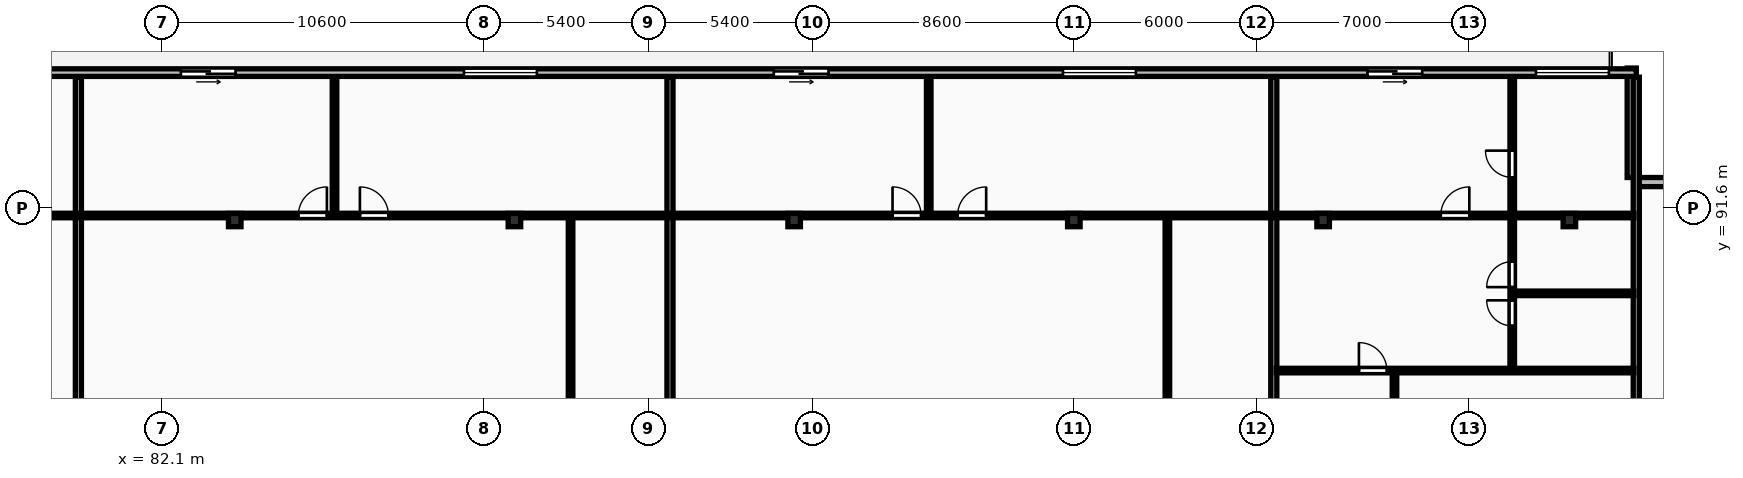
"""IFC4 building model, lengths in metres.
Left out: names, types, materials, properties, quantities, classifications, styles, units other than length and angle.
Written with IfcOpenShell. Run it as: python <this file> out.ifc"""

import sys

from ifc_helpers import new_model, si_unit, direction, frame, frame_2d, origin, origin_2d, place, context, subcontext, project, spatial, rectangle, i_section, extrude, element, fill, save


model = new_model("IFC4")
c1 = context("Model", 3, precision=1e-05, world=origin(), true_north=direction((0.0, 1.0)))
c2 = subcontext(c1, "Body", "Model", "MODEL_VIEW")
j1 = project(units=[si_unit("LENGTHUNIT", "METRE"), si_unit("PLANEANGLEUNIT", "RADIAN")], contexts=[c1])
p1 = place(None, origin())
s1 = spatial("IfcSite", under=j1, at=p1, CompositionType="ELEMENT")
p2 = place(p1, origin())
s2 = spatial("IfcBuilding", under=s1, at=p2, CompositionType="ELEMENT")
p3 = place(p2, frame((0.0, 0.0, 150.1)))
s3 = spatial("IfcBuildingStorey", under=s2, at=p3, CompositionType="ELEMENT", Elevation=150.1)
for number, where, z_axis, x_axis in (
    (1, (84.5, 91.2, 0.0), (0.0, 0.0, 1.0), (1.0, 0.0, 0.0)),
    (2, (93.7, 91.2, 0.0), (0.0, 0.0, 1.0), (1.0, 0.0, 0.0)),
    (3, (102.9, 91.2, 0.0), (0.0, 0.0, 1.0), (1.0, 0.0, 0.0)),
    (4, (112.1, 91.2, 0.0), (0.0, 0.0, 1.0), (1.0, 0.0, 0.0)),
    (5, (120.3, 91.2, 0.0), (0.0, 0.0, 1.0), (1.0, 0.0, 0.0)),
    (6, (128.4, 91.2, 0.0), (0.0, 0.0, 1.0), (1.0, 0.0, 0.0)),
):
    element("IfcColumn", number, at=place(p3, frame(where, z_axis=z_axis, x_axis=x_axis)), inside=s3, PredefinedType="COLUMN", context=c2, shape_type="SweptSolid", body=[
        extrude(i_section(OverallWidth=0.412, OverallDepth=0.437, WebThickness=0.036, FlangeThickness=0.052, FilletRadius=0.015, at=origin_2d()), origin(), (0.0, 0.0, 1.0), 3.6),
    ])
for number, where, z_axis, x_axis in (
    (7, (134.2, 92.45, 0.0), (0.0, 0.0, 1.0), (-1.0, 0.0, 0.0)),
    (8, (130.45, 92.6, 0.0), (0.0, 0.0, 1.0), (0.0, 1.0, 0.0)),
):
    element("IfcWall", number, at=place(p3, frame(where, z_axis=z_axis, x_axis=x_axis)), inside=s3, PredefinedType="STANDARD", context=c2, shape_type="SweptSolid", body=[
        extrude(rectangle(XDim=3.6, YDim=0.3, at=frame_2d((1.8, 0.0))), origin(), (0.0, 0.0, 1.0), 3.31),
    ])
p4 = place(p3, frame((130.6, 96.05, 0.0), z_axis=(0.0, 0.0, 1.0), x_axis=(-1.0, 0.0, 0.0)))
e9 = element("IfcWall", 9, at=p4, inside=s3, PredefinedType="STANDARD", context=c2, shape_type="SweptSolid", body=[
    extrude(rectangle(XDim=73.0, YDim=0.25, at=frame_2d((36.5, 0.0))), origin(), (0.0, 0.0, 1.0), 3.31),
])
p5 = place(p4, frame((67.311, 0.0, 0.0)))
e10 = element("IfcOpeningElement", 10, at=p5, cuts=e9, PredefinedType="OPENING", context=c2, shape_type="SweptSolid", body=[
    extrude(rectangle(XDim=1.8, YDim=2.2, at=frame_2d((0.9, 1.1))), frame((0.0, 0.135, 0.0), z_axis=(0.0, -1.0, 0.0), x_axis=(1.0, 0.0, 0.0)), (0.0, 0.0, 1.0), 0.27),
])
p6 = place(p4, frame((56.252, 0.0, 0.85)))
e11 = element("IfcOpeningElement", 11, at=p6, cuts=e9, PredefinedType="OPENING", context=c2, shape_type="SweptSolid", body=[
    extrude(rectangle(XDim=2.4, YDim=1.9, at=frame_2d((1.2, 0.95))), frame((0.0, 0.135, 0.0), z_axis=(0.0, -1.0, 0.0), x_axis=(1.0, 0.0, 0.0)), (0.0, 0.0, 1.0), 0.27),
])
p7 = place(p4, frame((46.071, 0.0, 0.0)))
e12 = element("IfcOpeningElement", 12, at=p7, cuts=e9, PredefinedType="OPENING", context=c2, shape_type="SweptSolid", body=[
    extrude(rectangle(XDim=1.8, YDim=2.2, at=frame_2d((0.9, 1.1))), frame((0.0, 0.135, 0.0), z_axis=(0.0, -1.0, 0.0), x_axis=(1.0, 0.0, 0.0)), (0.0, 0.0, 1.0), 0.27),
])
p8 = place(p4, frame((36.161, 0.0, 0.85)))
e13 = element("IfcOpeningElement", 13, at=p8, cuts=e9, PredefinedType="OPENING", context=c2, shape_type="SweptSolid", body=[
    extrude(rectangle(XDim=2.4, YDim=1.9, at=frame_2d((1.2, 0.95))), frame((0.0, 0.135, 0.0), z_axis=(0.0, -1.0, 0.0), x_axis=(1.0, 0.0, 0.0)), (0.0, 0.0, 1.0), 0.27),
])
p9 = place(p4, frame((26.569, 0.0, 0.0)))
e14 = element("IfcOpeningElement", 14, at=p9, cuts=e9, PredefinedType="OPENING", context=c2, shape_type="SweptSolid", body=[
    extrude(rectangle(XDim=1.8, YDim=2.2, at=frame_2d((0.9, 1.1))), frame((0.0, 0.135, 0.0), z_axis=(0.0, -1.0, 0.0), x_axis=(1.0, 0.0, 0.0)), (0.0, 0.0, 1.0), 0.27),
])
p10 = place(p4, frame((16.458, 0.0, 0.85)))
e15 = element("IfcOpeningElement", 15, at=p10, cuts=e9, PredefinedType="OPENING", context=c2, shape_type="SweptSolid", body=[
    extrude(rectangle(XDim=2.4, YDim=1.9, at=frame_2d((1.2, 0.95))), frame((0.0, 0.135, 0.0), z_axis=(0.0, -1.0, 0.0), x_axis=(1.0, 0.0, 0.0)), (0.0, 0.0, 1.0), 0.27),
])
p11 = place(p4, frame((7.042, 0.0, 0.0)))
e16 = element("IfcOpeningElement", 16, at=p11, cuts=e9, PredefinedType="OPENING", context=c2, shape_type="SweptSolid", body=[
    extrude(rectangle(XDim=1.8, YDim=2.2, at=frame_2d((0.9, 1.1))), frame((0.0, 0.135, 0.0), z_axis=(0.0, -1.0, 0.0), x_axis=(1.0, 0.0, 0.0)), (0.0, 0.0, 1.0), 0.27),
])
p12 = place(p4, frame((0.9, 0.0, 0.85)))
e17 = element("IfcOpeningElement", 17, at=p12, cuts=e9, PredefinedType="OPENING", context=c2, shape_type="SweptSolid", body=[
    extrude(rectangle(XDim=2.4, YDim=1.9, at=frame_2d((1.2, 0.95))), frame((0.0, 0.135, 0.0), z_axis=(0.0, -1.0, 0.0), x_axis=(1.0, 0.0, 0.0)), (0.0, 0.0, 1.0), 0.27),
])
for number, where, z_axis, x_axis in (
    (18, (130.6, 69.83, 0.0), (0.0, 0.0, 1.0), (0.0, 1.0, 0.0)),
    (19, (79.357, 69.83, 0.0), (0.0, 0.0, 1.0), (0.0, 1.0, 0.0)),
):
    element("IfcWall", number, at=place(p3, frame(where, z_axis=z_axis, x_axis=x_axis)), inside=s3, PredefinedType="PARTITIONING", context=c2, shape_type="SweptSolid", body=[
        extrude(rectangle(XDim=26.07, YDim=0.2, at=frame_2d((13.035, 0.0))), origin(), (0.0, 0.0, 1.0), 3.31),
    ])
p13 = place(p3, frame((57.68, 91.35, 0.0), z_axis=(0.0, 0.0, 1.0), x_axis=(1.0, 0.0, 0.0)))
e20 = element("IfcWall", 20, at=p13, inside=s3, PredefinedType="PARTITIONING", context=c2, shape_type="SweptSolid", body=[
    extrude(rectangle(XDim=21.597, YDim=0.15, at=frame_2d((10.799, 0.0))), origin(), (0.0, 0.0, 1.0), 3.003),
])
p14 = place(p13, frame((7.89, 0.0, 0.0)))
e21 = element("IfcOpeningElement", 21, at=p14, cuts=e20, PredefinedType="OPENING", context=c2, shape_type="SweptSolid", body=[
    extrude(rectangle(XDim=0.92, YDim=2.08, at=frame_2d((0.46, 1.04))), frame((0.0, 0.085, 0.0), z_axis=(0.0, -1.0, 0.0), x_axis=(1.0, 0.0, 0.0)), (0.0, 0.0, 1.0), 0.17),
])
p15 = place(p13, frame((11.842, 0.0, 0.0)))
e22 = element("IfcOpeningElement", 22, at=p15, cuts=e20, PredefinedType="OPENING", context=c2, shape_type="SweptSolid", body=[
    extrude(rectangle(XDim=0.92, YDim=2.08, at=frame_2d((0.46, 1.04))), frame((0.0, 0.085, 0.0), z_axis=(0.0, -1.0, 0.0), x_axis=(1.0, 0.0, 0.0)), (0.0, 0.0, 1.0), 0.17),
])
p16 = place(p3, frame((98.816, 69.83, 0.0), z_axis=(0.0, 0.0, 1.0), x_axis=(0.0, 1.0, 0.0)))
e23 = element("IfcWall", 23, at=p16, inside=s3, PredefinedType="PARTITIONING", context=c2, shape_type="SweptSolid", body=[
    extrude(rectangle(XDim=26.07, YDim=0.2, at=frame_2d((13.035, 0.0))), origin(), (0.0, 0.0, 1.0), 3.31),
])
p17 = place(p3, frame((95.546, 69.81, 0.0), z_axis=(0.0, 0.0, 1.0), x_axis=(0.0, 1.0, 0.0)))
e24 = element("IfcWall", 24, at=p17, inside=s3, PredefinedType="PARTITIONING", context=c2, shape_type="SweptSolid", body=[
    extrude(rectangle(XDim=21.48, YDim=0.15, at=frame_2d((10.74, 0.0))), origin(), (0.0, 0.0, 1.0), 3.31),
])
p18 = place(p17, frame((2.406, 0.0, 0.0)))
e25 = element("IfcOpeningElement", 25, at=p18, cuts=e24, PredefinedType="OPENING", context=c2, shape_type="SweptSolid", body=[
    extrude(rectangle(XDim=0.96, YDim=2.1, at=frame_2d((0.48, 1.05))), frame((0.0, 0.085, 0.0), z_axis=(0.0, -1.0, 0.0), x_axis=(1.0, 0.0, 0.0)), (0.0, 0.0, 1.0), 0.17),
])
p19 = place(p17, frame((6.133, 0.0, 0.0)))
e26 = element("IfcOpeningElement", 26, at=p19, cuts=e24, PredefinedType="OPENING", context=c2, shape_type="SweptSolid", body=[
    extrude(rectangle(XDim=0.88, YDim=2.06, at=frame_2d((0.44, 1.03))), frame((0.0, 0.085, 0.0), z_axis=(0.0, -1.0, 0.0), x_axis=(1.0, 0.0, 0.0)), (0.0, 0.0, 1.0), 0.17),
])
p20 = place(p17, frame((11.336, 0.0, 0.0)))
e27 = element("IfcOpeningElement", 27, at=p20, cuts=e24, PredefinedType="OPENING", context=c2, shape_type="SweptSolid", body=[
    extrude(rectangle(XDim=0.84, YDim=2.04, at=frame_2d((0.42, 1.02))), frame((0.0, 0.085, 0.0), z_axis=(0.0, -1.0, 0.0), x_axis=(1.0, 0.0, 0.0)), (0.0, 0.0, 1.0), 0.17),
])
p21 = place(p3, frame((87.781, 91.43, 0.0), z_axis=(0.0, 0.0, 1.0), x_axis=(0.0, 1.0, 0.0)))
e28 = element("IfcWall", 28, at=p21, inside=s3, PredefinedType="PARTITIONING", context=c2, shape_type="SweptSolid", body=[
    extrude(rectangle(XDim=4.47, YDim=0.15, at=frame_2d((2.235, 0.0))), origin(), (0.0, 0.0, 1.0), 3.31),
])
p22 = place(p3, frame((79.437, 91.35, 0.0), z_axis=(0.0, 0.0, 1.0), x_axis=(1.0, 0.0, 0.0)))
e29 = element("IfcWall", 29, at=p22, inside=s3, PredefinedType="PARTITIONING", context=c2, shape_type="SweptSolid", body=[
    extrude(rectangle(XDim=19.299, YDim=0.15, at=frame_2d((9.649, 0.0))), origin(), (0.0, 0.0, 1.0), 3.003),
])
p23 = place(p22, frame((7.155, 0.0, 0.0)))
e30 = element("IfcOpeningElement", 30, at=p23, cuts=e29, PredefinedType="OPENING", context=c2, shape_type="SweptSolid", body=[
    extrude(rectangle(XDim=0.94, YDim=2.1, at=frame_2d((0.47, 1.05))), frame((0.0, 0.085, 0.0), z_axis=(0.0, -1.0, 0.0), x_axis=(1.0, 0.0, 0.0)), (0.0, 0.0, 1.0), 0.17),
])
p24 = place(p22, frame((9.179, 0.0, 0.0)))
e31 = element("IfcOpeningElement", 31, at=p24, cuts=e29, PredefinedType="OPENING", context=c2, shape_type="SweptSolid", body=[
    extrude(rectangle(XDim=0.94, YDim=2.1, at=frame_2d((0.47, 1.05))), frame((0.0, 0.085, 0.0), z_axis=(0.0, -1.0, 0.0), x_axis=(1.0, 0.0, 0.0)), (0.0, 0.0, 1.0), 0.17),
])
p25 = place(p3, frame((118.677, 69.83, 0.0), z_axis=(0.0, 0.0, 1.0), x_axis=(0.0, 1.0, 0.0)))
e32 = element("IfcWall", 32, at=p25, inside=s3, PredefinedType="PARTITIONING", context=c2, shape_type="SweptSolid", body=[
    extrude(rectangle(XDim=26.07, YDim=0.2, at=frame_2d((13.035, 0.0))), origin(), (0.0, 0.0, 1.0), 3.31),
])
p26 = place(p3, frame((115.177, 69.81, 0.0), z_axis=(0.0, 0.0, 1.0), x_axis=(0.0, 1.0, 0.0)))
e33 = element("IfcWall", 33, at=p26, inside=s3, PredefinedType="PARTITIONING", context=c2, shape_type="SweptSolid", body=[
    extrude(rectangle(XDim=21.48, YDim=0.15, at=frame_2d((10.74, 0.0))), origin(), (0.0, 0.0, 1.0), 3.31),
])
p27 = place(p26, frame((2.406, 0.0, 0.0)))
e34 = element("IfcOpeningElement", 34, at=p27, cuts=e33, PredefinedType="OPENING", context=c2, shape_type="SweptSolid", body=[
    extrude(rectangle(XDim=0.96, YDim=2.1, at=frame_2d((0.48, 1.05))), frame((0.0, 0.085, 0.0), z_axis=(0.0, -1.0, 0.0), x_axis=(1.0, 0.0, 0.0)), (0.0, 0.0, 1.0), 0.17),
])
p28 = place(p26, frame((6.133, 0.0, 0.0)))
e35 = element("IfcOpeningElement", 35, at=p28, cuts=e33, PredefinedType="OPENING", context=c2, shape_type="SweptSolid", body=[
    extrude(rectangle(XDim=0.88, YDim=2.06, at=frame_2d((0.44, 1.03))), frame((0.0, 0.085, 0.0), z_axis=(0.0, -1.0, 0.0), x_axis=(1.0, 0.0, 0.0)), (0.0, 0.0, 1.0), 0.17),
])
p29 = place(p26, frame((10.32, 0.0, 0.0)))
e36 = element("IfcOpeningElement", 36, at=p29, cuts=e33, PredefinedType="OPENING", context=c2, shape_type="SweptSolid", body=[
    extrude(rectangle(XDim=0.84, YDim=2.04, at=frame_2d((0.42, 1.02))), frame((0.0, 0.085, 0.0), z_axis=(0.0, -1.0, 0.0), x_axis=(1.0, 0.0, 0.0)), (0.0, 0.0, 1.0), 0.17),
])
p30 = place(p3, frame((107.327, 91.43, 0.0), z_axis=(0.0, 0.0, 1.0), x_axis=(0.0, 1.0, 0.0)))
e37 = element("IfcWall", 37, at=p30, inside=s3, PredefinedType="PARTITIONING", context=c2, shape_type="SweptSolid", body=[
    extrude(rectangle(XDim=4.47, YDim=0.15, at=frame_2d((2.235, 0.0))), origin(), (0.0, 0.0, 1.0), 3.31),
])
p31 = place(p3, frame((98.896, 91.35, 0.0), z_axis=(0.0, 0.0, 1.0), x_axis=(1.0, 0.0, 0.0)))
e38 = element("IfcWall", 38, at=p31, inside=s3, PredefinedType="PARTITIONING", context=c2, shape_type="SweptSolid", body=[
    extrude(rectangle(XDim=19.701, YDim=0.15, at=frame_2d((9.851, 0.0))), origin(), (0.0, 0.0, 1.0), 3.003),
])
p32 = place(p31, frame((7.24, 0.0, 0.0)))
e39 = element("IfcOpeningElement", 39, at=p32, cuts=e38, PredefinedType="OPENING", context=c2, shape_type="SweptSolid", body=[
    extrude(rectangle(XDim=0.94, YDim=2.1, at=frame_2d((0.47, 1.05))), frame((0.0, 0.085, 0.0), z_axis=(0.0, -1.0, 0.0), x_axis=(1.0, 0.0, 0.0)), (0.0, 0.0, 1.0), 0.17),
])
p33 = place(p31, frame((9.381, 0.0, 0.0)))
e40 = element("IfcOpeningElement", 40, at=p33, cuts=e38, PredefinedType="OPENING", context=c2, shape_type="SweptSolid", body=[
    extrude(rectangle(XDim=0.94, YDim=2.1, at=frame_2d((0.47, 1.05))), frame((0.0, 0.085, 0.0), z_axis=(0.0, -1.0, 0.0), x_axis=(1.0, 0.0, 0.0)), (0.0, 0.0, 1.0), 0.17),
])
p34 = place(p3, frame((122.647, 69.81, 0.0), z_axis=(0.0, 0.0, 1.0), x_axis=(0.0, 1.0, 0.0)))
e41 = element("IfcWall", 41, at=p34, inside=s3, PredefinedType="PARTITIONING", context=c2, shape_type="SweptSolid", body=[
    extrude(rectangle(XDim=16.4, YDim=0.15, at=frame_2d((8.2, 0.0))), origin(), (0.0, 0.0, 1.0), 3.31),
])
p35 = place(p34, frame((7.07, 0.0, 0.0)))
e42 = element("IfcOpeningElement", 42, at=p35, cuts=e41, PredefinedType="OPENING", context=c2, shape_type="SweptSolid", body=[
    extrude(rectangle(XDim=0.88, YDim=2.06, at=frame_2d((0.44, 1.03))), frame((0.0, 0.085, 0.0), z_axis=(0.0, -1.0, 0.0), x_axis=(1.0, 0.0, 0.0)), (0.0, 0.0, 1.0), 0.17),
])
p36 = place(p3, frame((126.58, 88.79, 0.0), z_axis=(0.0, 0.0, 1.0), x_axis=(1.0, 0.0, 0.0)))
e43 = element("IfcWall", 43, at=p36, inside=s3, PredefinedType="PARTITIONING", context=c2, shape_type="SweptSolid", body=[
    extrude(rectangle(XDim=3.94, YDim=0.15, at=frame_2d((1.97, 0.0))), origin(), (0.0, 0.0, 1.0), 3.31),
])
p37 = place(p3, frame((126.52, 86.29, 0.0), z_axis=(0.0, 0.0, 1.0), x_axis=(0.0, 1.0, 0.0)))
e44 = element("IfcWall", 44, at=p37, inside=s3, PredefinedType="PARTITIONING", context=c2, shape_type="SweptSolid", body=[
    extrude(rectangle(XDim=9.61, YDim=0.15, at=frame_2d((4.805, 0.0))), origin(), (0.0, 0.0, 1.0), 3.31),
])
p38 = place(p37, frame((1.43, 0.0, 0.0)))
e45 = element("IfcOpeningElement", 45, at=p38, cuts=e44, PredefinedType="OPENING", context=c2, shape_type="SweptSolid", body=[
    extrude(rectangle(XDim=0.84, YDim=2.04, at=frame_2d((0.42, 1.02))), frame((0.0, 0.085, 0.0), z_axis=(0.0, -1.0, 0.0), x_axis=(1.0, 0.0, 0.0)), (0.0, 0.0, 1.0), 0.17),
])
p39 = place(p37, frame((2.705, 0.0, 0.0)))
e46 = element("IfcOpeningElement", 46, at=p39, cuts=e44, PredefinedType="OPENING", context=c2, shape_type="SweptSolid", body=[
    extrude(rectangle(XDim=0.84, YDim=2.04, at=frame_2d((0.42, 1.02))), frame((0.0, 0.085, 0.0), z_axis=(0.0, -1.0, 0.0), x_axis=(1.0, 0.0, 0.0)), (0.0, 0.0, 1.0), 0.17),
])
p40 = place(p37, frame((6.314, 0.0, 0.0)))
e47 = element("IfcOpeningElement", 47, at=p40, cuts=e44, PredefinedType="OPENING", context=c2, shape_type="SweptSolid", body=[
    extrude(rectangle(XDim=0.88, YDim=2.06, at=frame_2d((0.44, 1.03))), frame((0.0, 0.085, 0.0), z_axis=(0.0, -1.0, 0.0), x_axis=(1.0, 0.0, 0.0)), (0.0, 0.0, 1.0), 0.17),
])
p41 = place(p3, frame((118.757, 86.25, 0.0), z_axis=(0.0, 0.0, 1.0), x_axis=(1.0, 0.0, 0.0)))
e48 = element("IfcWall", 48, at=p41, inside=s3, PredefinedType="PARTITIONING", context=c2, shape_type="SweptSolid", body=[
    extrude(rectangle(XDim=11.763, YDim=0.15, at=frame_2d((5.881, 0.0))), origin(), (0.0, 0.0, 1.0), 3.31),
])
p42 = place(p41, frame((2.72, 0.0, 0.0)))
e49 = element("IfcOpeningElement", 49, at=p42, cuts=e48, PredefinedType="OPENING", context=c2, shape_type="SweptSolid", body=[
    extrude(rectangle(XDim=0.92, YDim=2.08, at=frame_2d((0.46, 1.04))), frame((0.0, 0.085, 0.0), z_axis=(0.0, -1.0, 0.0), x_axis=(1.0, 0.0, 0.0)), (0.0, 0.0, 1.0), 0.17),
])
p43 = place(p3, frame((118.757, 91.35, 0.0), z_axis=(0.0, 0.0, 1.0), x_axis=(1.0, 0.0, 0.0)))
e50 = element("IfcWall", 50, at=p43, inside=s3, PredefinedType="PARTITIONING", context=c2, shape_type="SweptSolid", body=[
    extrude(rectangle(XDim=11.763, YDim=0.15, at=frame_2d((5.881, 0.0))), origin(), (0.0, 0.0, 1.0), 3.003),
])
p44 = place(p43, frame((5.411, 0.0, 0.0)))
e51 = element("IfcOpeningElement", 51, at=p44, cuts=e50, PredefinedType="OPENING", context=c2, shape_type="SweptSolid", body=[
    extrude(rectangle(XDim=0.94, YDim=2.1, at=frame_2d((0.47, 1.05))), frame((0.0, 0.085, 0.0), z_axis=(0.0, -1.0, 0.0), x_axis=(1.0, 0.0, 0.0)), (0.0, 0.0, 1.0), 0.17),
])
p45 = place(p7, origin())
e52 = element("IfcDoor", 52, at=p45, inside=s3, OperationType="SLIDING_TO_LEFT", PredefinedType="DOOR", context=c2, shape_type="SweptSolid", body=[
    extrude(rectangle(XDim=1.8, YDim=2.2, at=frame_2d((0.9, 1.1))), frame((0.0, 0.025, 0.0), z_axis=(0.0, -1.0, 0.0), x_axis=(1.0, 0.0, 0.0)), (0.0, 0.0, 1.0), 0.05),
])
fill(e12, e52)
p46 = place(p8, origin())
e53 = element("IfcWindow", 53, at=p46, inside=s3, PartitioningType="DOUBLE_PANEL_VERTICAL", PredefinedType="WINDOW", context=c2, shape_type="SweptSolid", body=[
    extrude(rectangle(XDim=2.4, YDim=1.9, at=frame_2d((1.2, 0.95))), frame((0.0, 0.03, 0.0), z_axis=(0.0, -1.0, 0.0), x_axis=(1.0, 0.0, 0.0)), (0.0, 0.0, 1.0), 0.06),
])
fill(e13, e53)
p47 = place(p9, origin())
e54 = element("IfcDoor", 54, at=p47, inside=s3, OperationType="SLIDING_TO_LEFT", PredefinedType="DOOR", context=c2, shape_type="SweptSolid", body=[
    extrude(rectangle(XDim=1.8, YDim=2.2, at=frame_2d((0.9, 1.1))), frame((0.0, 0.025, 0.0), z_axis=(0.0, -1.0, 0.0), x_axis=(1.0, 0.0, 0.0)), (0.0, 0.0, 1.0), 0.05),
])
fill(e14, e54)
p48 = place(p10, origin())
e55 = element("IfcWindow", 55, at=p48, inside=s3, PartitioningType="DOUBLE_PANEL_VERTICAL", PredefinedType="WINDOW", context=c2, shape_type="SweptSolid", body=[
    extrude(rectangle(XDim=2.4, YDim=1.9, at=frame_2d((1.2, 0.95))), frame((0.0, 0.03, 0.0), z_axis=(0.0, -1.0, 0.0), x_axis=(1.0, 0.0, 0.0)), (0.0, 0.0, 1.0), 0.06),
])
fill(e15, e55)
p49 = place(p11, origin())
e56 = element("IfcDoor", 56, at=p49, inside=s3, OperationType="SLIDING_TO_LEFT", PredefinedType="DOOR", context=c2, shape_type="SweptSolid", body=[
    extrude(rectangle(XDim=1.8, YDim=2.2, at=frame_2d((0.9, 1.1))), frame((0.0, 0.025, 0.0), z_axis=(0.0, -1.0, 0.0), x_axis=(1.0, 0.0, 0.0)), (0.0, 0.0, 1.0), 0.05),
])
fill(e16, e56)
p50 = place(p12, origin())
e57 = element("IfcWindow", 57, at=p50, inside=s3, PartitioningType="DOUBLE_PANEL_VERTICAL", PredefinedType="WINDOW", context=c2, shape_type="SweptSolid", body=[
    extrude(rectangle(XDim=2.4, YDim=1.9, at=frame_2d((1.2, 0.95))), frame((0.0, 0.03, 0.0), z_axis=(0.0, -1.0, 0.0), x_axis=(1.0, 0.0, 0.0)), (0.0, 0.0, 1.0), 0.06),
])
fill(e17, e57)
p51 = place(p23, origin())
e58 = element("IfcDoor", 58, at=p51, inside=s3, OperationType="SINGLE_SWING_RIGHT", PredefinedType="DOOR", context=c2, shape_type="SweptSolid", body=[
    extrude(rectangle(XDim=0.94, YDim=2.1, at=frame_2d((0.47, 1.05))), frame((0.0, 0.025, 0.0), z_axis=(0.0, -1.0, 0.0), x_axis=(1.0, 0.0, 0.0)), (0.0, 0.0, 1.0), 0.05),
])
fill(e30, e58)
p52 = place(p24, origin())
e59 = element("IfcDoor", 59, at=p52, inside=s3, OperationType="SINGLE_SWING_LEFT", PredefinedType="DOOR", context=c2, shape_type="SweptSolid", body=[
    extrude(rectangle(XDim=0.94, YDim=2.1, at=frame_2d((0.47, 1.05))), frame((0.0, 0.025, 0.0), z_axis=(0.0, -1.0, 0.0), x_axis=(1.0, 0.0, 0.0)), (0.0, 0.0, 1.0), 0.05),
])
fill(e31, e59)
p53 = place(p32, origin())
e60 = element("IfcDoor", 60, at=p53, inside=s3, OperationType="SINGLE_SWING_LEFT", PredefinedType="DOOR", context=c2, shape_type="SweptSolid", body=[
    extrude(rectangle(XDim=0.94, YDim=2.1, at=frame_2d((0.47, 1.05))), frame((0.0, 0.025, 0.0), z_axis=(0.0, -1.0, 0.0), x_axis=(1.0, 0.0, 0.0)), (0.0, 0.0, 1.0), 0.05),
])
fill(e39, e60)
p54 = place(p33, origin())
e61 = element("IfcDoor", 61, at=p54, inside=s3, OperationType="SINGLE_SWING_RIGHT", PredefinedType="DOOR", context=c2, shape_type="SweptSolid", body=[
    extrude(rectangle(XDim=0.94, YDim=2.1, at=frame_2d((0.47, 1.05))), frame((0.0, 0.025, 0.0), z_axis=(0.0, -1.0, 0.0), x_axis=(1.0, 0.0, 0.0)), (0.0, 0.0, 1.0), 0.05),
])
fill(e40, e61)
p55 = place(p38, origin())
e62 = element("IfcDoor", 62, at=p55, inside=s3, OperationType="SINGLE_SWING_RIGHT", PredefinedType="DOOR", context=c2, shape_type="SweptSolid", body=[
    extrude(rectangle(XDim=0.84, YDim=2.04, at=frame_2d((0.42, 1.02))), frame((0.0, 0.025, 0.0), z_axis=(0.0, -1.0, 0.0), x_axis=(1.0, 0.0, 0.0)), (0.0, 0.0, 1.0), 0.05),
])
fill(e45, e62)
p56 = place(p39, origin())
e63 = element("IfcDoor", 63, at=p56, inside=s3, OperationType="SINGLE_SWING_LEFT", PredefinedType="DOOR", context=c2, shape_type="SweptSolid", body=[
    extrude(rectangle(XDim=0.84, YDim=2.04, at=frame_2d((0.42, 1.02))), frame((0.0, 0.025, 0.0), z_axis=(0.0, -1.0, 0.0), x_axis=(1.0, 0.0, 0.0)), (0.0, 0.0, 1.0), 0.05),
])
fill(e46, e63)
p57 = place(p40, origin())
e64 = element("IfcDoor", 64, at=p57, inside=s3, OperationType="SINGLE_SWING_RIGHT", PredefinedType="DOOR", context=c2, shape_type="SweptSolid", body=[
    extrude(rectangle(XDim=0.88, YDim=2.06, at=frame_2d((0.44, 1.03))), frame((0.0, 0.025, 0.0), z_axis=(0.0, -1.0, 0.0), x_axis=(1.0, 0.0, 0.0)), (0.0, 0.0, 1.0), 0.05),
])
fill(e47, e64)
p58 = place(p42, origin())
e65 = element("IfcDoor", 65, at=p58, inside=s3, OperationType="SINGLE_SWING_LEFT", PredefinedType="DOOR", context=c2, shape_type="SweptSolid", body=[
    extrude(rectangle(XDim=0.92, YDim=2.08, at=frame_2d((0.46, 1.04))), frame((0.0, 0.025, 0.0), z_axis=(0.0, -1.0, 0.0), x_axis=(1.0, 0.0, 0.0)), (0.0, 0.0, 1.0), 0.05),
])
fill(e49, e65)
p59 = place(p44, origin())
e66 = element("IfcDoor", 66, at=p59, inside=s3, OperationType="SINGLE_SWING_RIGHT", PredefinedType="DOOR", context=c2, shape_type="SweptSolid", body=[
    extrude(rectangle(XDim=0.94, YDim=2.1, at=frame_2d((0.47, 1.05))), frame((0.0, 0.025, 0.0), z_axis=(0.0, -1.0, 0.0), x_axis=(1.0, 0.0, 0.0)), (0.0, 0.0, 1.0), 0.05),
])
fill(e51, e66)
save(model, sys.argv[1])
